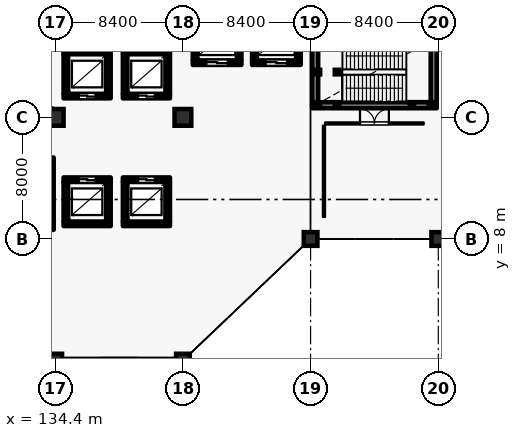
"""IFC4 building model, lengths in metres.
Left out: names, types, materials, properties, quantities, classifications, styles, units other than length and angle.
Written with IfcOpenShell. Run it as: python <this file> out.ifc"""

import sys

from ifc_helpers import new_model, si_unit, direction, frame, frame_2d, origin, origin_2d, place, context, subcontext, project, spatial, rectangle, hollow_rectangle, circle, extrude, element, fill, save


model = new_model("IFC4")
c1 = context("Model", 3, precision=1e-05, world=origin(), true_north=direction((0.0, 1.0)))
c2 = subcontext(c1, "Body", "Model", "MODEL_VIEW")
j1 = project(units=[si_unit("LENGTHUNIT", "METRE"), si_unit("PLANEANGLEUNIT", "RADIAN")], contexts=[c1])
p1 = place(None, origin())
s1 = spatial("IfcSite", under=j1, at=p1, CompositionType="ELEMENT")
p2 = place(p1, origin())
s2 = spatial("IfcBuilding", under=s1, at=p2, CompositionType="ELEMENT")
p3 = place(p2, origin())
s3 = spatial("IfcBuildingStorey", under=s2, at=p3, CompositionType="ELEMENT", Elevation=0.0)
p4 = place(p3, frame((134.4, 0.0, 0.0), z_axis=(0.0, 0.0, 1.0), x_axis=(1.0, 0.0, 0.0)))
e1 = element("IfcColumn", 1, at=p4, inside=s3, PredefinedType="COLUMN", context=c2, shape_type="SweptSolid", body=[
    extrude(circle(Radius=0.45, at=origin_2d()), origin(), (0.0, 0.0, 1.0), 6.0),
])
p5 = place(p3, frame((134.4, 16.0, 0.0), z_axis=(0.0, 0.0, 1.0), x_axis=(1.0, 0.0, 0.0)))
e2 = element("IfcColumn", 2, at=p5, inside=s3, PredefinedType="COLUMN", context=c2, shape_type="SweptSolid", body=[
    extrude(circle(Radius=0.55, at=origin_2d()), origin(), (0.0, 0.0, 1.0), 6.0),
])
p6 = place(p3, frame((142.8, 0.0, 0.0), z_axis=(0.0, 0.0, 1.0), x_axis=(1.0, 0.0, 0.0)))
e3 = element("IfcColumn", 3, at=p6, inside=s3, PredefinedType="COLUMN", context=c2, shape_type="SweptSolid", body=[
    extrude(circle(Radius=0.45, at=origin_2d()), origin(), (0.0, 0.0, 1.0), 6.0),
])
p7 = place(p3, frame((142.8, 16.0, 0.0), z_axis=(0.0, 0.0, 1.0), x_axis=(1.0, 0.0, 0.0)))
e4 = element("IfcColumn", 4, at=p7, inside=s3, PredefinedType="COLUMN", context=c2, shape_type="SweptSolid", body=[
    extrude(circle(Radius=0.55, at=origin_2d()), origin(), (0.0, 0.0, 1.0), 6.0),
])
for number, where, z_axis, x_axis in (
    (5, (151.2, 8.0, 0.0), (0.0, 0.0, 1.0), (1.0, 0.0, 0.0)),
    (6, (159.6, 8.0, 0.0), (0.0, 0.0, 1.0), (1.0, 0.0, 0.0)),
):
    element("IfcColumn", number, at=place(p3, frame(where, z_axis=z_axis, x_axis=x_axis)), inside=s3, PredefinedType="COLUMN", context=c2, shape_type="SweptSolid", body=[
        extrude(circle(Radius=0.45, at=origin_2d()), origin(), (0.0, 0.0, 1.0), 6.0),
    ])
p8 = place(p3, frame((134.95, 17.4, 0.0), z_axis=(0.0, 0.0, 1.0), x_axis=(1.0, 0.0, 0.0)))
e7 = element("IfcWall", 7, at=p8, inside=s3, PredefinedType="SHEAR", context=c2, shape_type="SweptSolid", body=[
    extrude(rectangle(XDim=3.1, YDim=0.3, at=frame_2d((1.55, 0.0))), origin(), (0.0, 0.0, 1.0), 5.675),
])
p9 = place(p8, frame((1.0, 0.0, 0.0)))
e8 = element("IfcOpeningElement", 8, at=p9, cuts=e7, PredefinedType="OPENING", context=c2, shape_type="SweptSolid", body=[
    extrude(rectangle(XDim=1.1, YDim=2.2, at=frame_2d((0.55, 1.1))), frame((0.0, 0.16, 0.0), z_axis=(0.0, -1.0, 0.0), x_axis=(1.0, 0.0, 0.0)), (0.0, 0.0, 1.0), 0.32),
])
p10 = place(p3, frame((137.9, 17.555, 0.0), z_axis=(0.0, 0.0, 1.0), x_axis=(0.0, 1.0, 0.0)))
e9 = element("IfcWall", 9, at=p10, inside=s3, PredefinedType="SHEAR", context=c2, shape_type="SweptSolid", body=[
    extrude(rectangle(XDim=2.59, YDim=0.3, at=frame_2d((1.295, 0.0))), origin(), (0.0, 0.0, 1.0), 5.675),
])
p11 = place(p3, frame((138.05, 20.3, 0.0), z_axis=(0.0, 0.0, 1.0), x_axis=(-1.0, 0.0, 0.0)))
e10 = element("IfcWall", 10, at=p11, inside=s3, PredefinedType="SHEAR", context=c2, shape_type="SweptSolid", body=[
    extrude(rectangle(XDim=3.1, YDim=0.3, at=frame_2d((1.55, 0.0))), origin(), (0.0, 0.0, 1.0), 5.675),
])
p12 = place(p3, frame((135.1, 20.145, 0.0), z_axis=(0.0, 0.0, 1.0), x_axis=(0.0, -1.0, 0.0)))
e11 = element("IfcWall", 11, at=p12, inside=s3, PredefinedType="SHEAR", context=c2, shape_type="SweptSolid", body=[
    extrude(rectangle(XDim=2.59, YDim=0.3, at=frame_2d((1.295, 0.0))), origin(), (0.0, 0.0, 1.0), 5.675),
])
p13 = place(p3, frame((138.85, 17.4, 0.0), z_axis=(0.0, 0.0, 1.0), x_axis=(1.0, 0.0, 0.0)))
e12 = element("IfcWall", 12, at=p13, inside=s3, PredefinedType="SHEAR", context=c2, shape_type="SweptSolid", body=[
    extrude(rectangle(XDim=3.1, YDim=0.3, at=frame_2d((1.55, 0.0))), origin(), (0.0, 0.0, 1.0), 5.675),
])
p14 = place(p13, frame((1.0, 0.0, 0.0)))
e13 = element("IfcOpeningElement", 13, at=p14, cuts=e12, PredefinedType="OPENING", context=c2, shape_type="SweptSolid", body=[
    extrude(rectangle(XDim=1.1, YDim=2.2, at=frame_2d((0.55, 1.1))), frame((0.0, 0.16, 0.0), z_axis=(0.0, -1.0, 0.0), x_axis=(1.0, 0.0, 0.0)), (0.0, 0.0, 1.0), 0.32),
])
p15 = place(p3, frame((141.8, 17.555, 0.0), z_axis=(0.0, 0.0, 1.0), x_axis=(0.0, 1.0, 0.0)))
e14 = element("IfcWall", 14, at=p15, inside=s3, PredefinedType="SHEAR", context=c2, shape_type="SweptSolid", body=[
    extrude(rectangle(XDim=2.59, YDim=0.3, at=frame_2d((1.295, 0.0))), origin(), (0.0, 0.0, 1.0), 5.675),
])
p16 = place(p3, frame((141.95, 20.3, 0.0), z_axis=(0.0, 0.0, 1.0), x_axis=(-1.0, 0.0, 0.0)))
e15 = element("IfcWall", 15, at=p16, inside=s3, PredefinedType="SHEAR", context=c2, shape_type="SweptSolid", body=[
    extrude(rectangle(XDim=3.1, YDim=0.3, at=frame_2d((1.55, 0.0))), origin(), (0.0, 0.0, 1.0), 5.675),
])
p17 = place(p3, frame((139.0, 20.145, 0.0), z_axis=(0.0, 0.0, 1.0), x_axis=(0.0, -1.0, 0.0)))
e16 = element("IfcWall", 16, at=p17, inside=s3, PredefinedType="SHEAR", context=c2, shape_type="SweptSolid", body=[
    extrude(rectangle(XDim=2.59, YDim=0.3, at=frame_2d((1.295, 0.0))), origin(), (0.0, 0.0, 1.0), 5.675),
])
p18 = place(p3, frame((134.95, 9.0, 0.0), z_axis=(0.0, 0.0, 1.0), x_axis=(1.0, 0.0, 0.0)))
e17 = element("IfcWall", 17, at=p18, inside=s3, PredefinedType="SHEAR", context=c2, shape_type="SweptSolid", body=[
    extrude(rectangle(XDim=3.1, YDim=0.3, at=frame_2d((1.55, 0.0))), origin(), (0.0, 0.0, 1.0), 5.675),
])
p19 = place(p3, frame((137.9, 9.155, 0.0), z_axis=(0.0, 0.0, 1.0), x_axis=(0.0, 1.0, 0.0)))
e18 = element("IfcWall", 18, at=p19, inside=s3, PredefinedType="SHEAR", context=c2, shape_type="SweptSolid", body=[
    extrude(rectangle(XDim=2.59, YDim=0.3, at=frame_2d((1.295, 0.0))), origin(), (0.0, 0.0, 1.0), 5.675),
])
p20 = place(p3, frame((138.05, 11.9, 0.0), z_axis=(0.0, 0.0, 1.0), x_axis=(-1.0, 0.0, 0.0)))
e19 = element("IfcWall", 19, at=p20, inside=s3, PredefinedType="SHEAR", context=c2, shape_type="SweptSolid", body=[
    extrude(rectangle(XDim=3.1, YDim=0.3, at=frame_2d((1.55, 0.0))), origin(), (0.0, 0.0, 1.0), 5.675),
])
p21 = place(p20, frame((1.0, 0.0, 0.0)))
e20 = element("IfcOpeningElement", 20, at=p21, cuts=e19, PredefinedType="OPENING", context=c2, shape_type="SweptSolid", body=[
    extrude(rectangle(XDim=1.1, YDim=2.2, at=frame_2d((0.55, 1.1))), frame((0.0, 0.16, 0.0), z_axis=(0.0, -1.0, 0.0), x_axis=(1.0, 0.0, 0.0)), (0.0, 0.0, 1.0), 0.32),
])
p22 = place(p3, frame((135.1, 11.745, 0.0), z_axis=(0.0, 0.0, 1.0), x_axis=(0.0, -1.0, 0.0)))
e21 = element("IfcWall", 21, at=p22, inside=s3, PredefinedType="SHEAR", context=c2, shape_type="SweptSolid", body=[
    extrude(rectangle(XDim=2.59, YDim=0.3, at=frame_2d((1.295, 0.0))), origin(), (0.0, 0.0, 1.0), 5.675),
])
p23 = place(p3, frame((138.85, 9.0, 0.0), z_axis=(0.0, 0.0, 1.0), x_axis=(1.0, 0.0, 0.0)))
e22 = element("IfcWall", 22, at=p23, inside=s3, PredefinedType="SHEAR", context=c2, shape_type="SweptSolid", body=[
    extrude(rectangle(XDim=3.1, YDim=0.3, at=frame_2d((1.55, 0.0))), origin(), (0.0, 0.0, 1.0), 5.675),
])
p24 = place(p3, frame((141.8, 9.155, 0.0), z_axis=(0.0, 0.0, 1.0), x_axis=(0.0, 1.0, 0.0)))
e23 = element("IfcWall", 23, at=p24, inside=s3, PredefinedType="SHEAR", context=c2, shape_type="SweptSolid", body=[
    extrude(rectangle(XDim=2.59, YDim=0.3, at=frame_2d((1.295, 0.0))), origin(), (0.0, 0.0, 1.0), 5.675),
])
p25 = place(p3, frame((141.95, 11.9, 0.0), z_axis=(0.0, 0.0, 1.0), x_axis=(-1.0, 0.0, 0.0)))
e24 = element("IfcWall", 24, at=p25, inside=s3, PredefinedType="SHEAR", context=c2, shape_type="SweptSolid", body=[
    extrude(rectangle(XDim=3.1, YDim=0.3, at=frame_2d((1.55, 0.0))), origin(), (0.0, 0.0, 1.0), 5.675),
])
p26 = place(p25, frame((1.0, 0.0, 0.0)))
e25 = element("IfcOpeningElement", 25, at=p26, cuts=e24, PredefinedType="OPENING", context=c2, shape_type="SweptSolid", body=[
    extrude(rectangle(XDim=1.1, YDim=2.2, at=frame_2d((0.55, 1.1))), frame((0.0, 0.16, 0.0), z_axis=(0.0, -1.0, 0.0), x_axis=(1.0, 0.0, 0.0)), (0.0, 0.0, 1.0), 0.32),
])
p27 = place(p3, frame((139.0, 11.745, 0.0), z_axis=(0.0, 0.0, 1.0), x_axis=(0.0, -1.0, 0.0)))
e26 = element("IfcWall", 26, at=p27, inside=s3, PredefinedType="SHEAR", context=c2, shape_type="SweptSolid", body=[
    extrude(rectangle(XDim=2.59, YDim=0.3, at=frame_2d((1.295, 0.0))), origin(), (0.0, 0.0, 1.0), 5.675),
])
p28 = place(p3, frame((143.45, 19.6, 0.0), z_axis=(0.0, 0.0, 1.0), x_axis=(1.0, 0.0, 0.0)))
e27 = element("IfcWall", 27, at=p28, inside=s3, PredefinedType="SHEAR", context=c2, shape_type="SweptSolid", body=[
    extrude(rectangle(XDim=3.2, YDim=0.3, at=frame_2d((1.6, 0.0))), origin(), (0.0, 0.0, 1.0), 5.675),
])
p29 = place(p28, frame((0.9, 0.0, 0.0)))
e28 = element("IfcOpeningElement", 28, at=p29, cuts=e27, PredefinedType="OPENING", context=c2, shape_type="SweptSolid", body=[
    extrude(rectangle(XDim=1.4, YDim=2.35, at=frame_2d((0.7, 1.175))), frame((0.0, 0.16, 0.0), z_axis=(0.0, -1.0, 0.0), x_axis=(1.0, 0.0, 0.0)), (0.0, 0.0, 1.0), 0.32),
])
for number, where, z_axis, x_axis in (
    (29, (146.5, 19.755, 0.0), (0.0, 0.0, 1.0), (0.0, 1.0, 0.0)),
    (30, (143.6, 22.445, 0.0), (0.0, 0.0, 1.0), (0.0, -1.0, 0.0)),
):
    element("IfcWall", number, at=place(p3, frame(where, z_axis=z_axis, x_axis=x_axis)), inside=s3, PredefinedType="SHEAR", context=c2, shape_type="SweptSolid", body=[
        extrude(rectangle(XDim=2.69, YDim=0.3, at=frame_2d((1.345, 0.0))), origin(), (0.0, 0.0, 1.0), 5.675),
    ])
p30 = place(p3, frame((147.35, 19.6, 0.0), z_axis=(0.0, 0.0, 1.0), x_axis=(1.0, 0.0, 0.0)))
e31 = element("IfcWall", 31, at=p30, inside=s3, PredefinedType="SHEAR", context=c2, shape_type="SweptSolid", body=[
    extrude(rectangle(XDim=3.2, YDim=0.3, at=frame_2d((1.6, 0.0))), origin(), (0.0, 0.0, 1.0), 5.675),
])
p31 = place(p30, frame((0.9, 0.0, 0.0)))
e32 = element("IfcOpeningElement", 32, at=p31, cuts=e31, PredefinedType="OPENING", context=c2, shape_type="SweptSolid", body=[
    extrude(rectangle(XDim=1.4, YDim=2.35, at=frame_2d((0.7, 1.175))), frame((0.0, 0.16, 0.0), z_axis=(0.0, -1.0, 0.0), x_axis=(1.0, 0.0, 0.0)), (0.0, 0.0, 1.0), 0.32),
])
for number, where, z_axis, x_axis in (
    (33, (150.4, 19.755, 0.0), (0.0, 0.0, 1.0), (0.0, 1.0, 0.0)),
    (34, (147.5, 22.445, 0.0), (0.0, 0.0, 1.0), (0.0, -1.0, 0.0)),
):
    element("IfcWall", number, at=place(p3, frame(where, z_axis=z_axis, x_axis=x_axis)), inside=s3, PredefinedType="SHEAR", context=c2, shape_type="SweptSolid", body=[
        extrude(rectangle(XDim=2.69, YDim=0.3, at=frame_2d((1.345, 0.0))), origin(), (0.0, 0.0, 1.0), 5.675),
    ])
p32 = place(p3, frame((126.1, 8.8, 0.0), z_axis=(0.0, 0.0, 1.0), x_axis=(1.0, 0.0, 0.0)))
e35 = element("IfcWall", 35, at=p32, inside=s3, PredefinedType="SHEAR", context=c2, shape_type="SweptSolid", body=[
    extrude(rectangle(XDim=8.2, YDim=0.4, at=frame_2d((4.1, 0.0))), origin(), (0.0, 0.0, 1.0), 5.675),
])
p33 = place(p3, frame((134.1, 9.005, 0.0), z_axis=(0.0, 0.0, 1.0), x_axis=(0.0, 1.0, 0.0)))
e36 = element("IfcWall", 36, at=p33, inside=s3, PredefinedType="SHEAR", context=c2, shape_type="SweptSolid", body=[
    extrude(rectangle(XDim=3.95, YDim=0.4, at=frame_2d((1.975, 0.0))), origin(), (0.0, 0.0, 1.0), 5.675),
])
p34 = place(p3, frame((126.1, 13.16, 0.0), z_axis=(0.0, 0.0, 1.0), x_axis=(1.0, 0.0, 0.0)))
e37 = element("IfcWall", 37, at=p34, inside=s3, PredefinedType="SHEAR", context=c2, shape_type="SweptSolid", body=[
    extrude(rectangle(XDim=8.2, YDim=0.4, at=frame_2d((4.1, 0.0))), origin(), (0.0, 0.0, 1.0), 5.675),
])
p35 = place(p34, frame((0.43, 0.0, 0.0)))
e38 = element("IfcOpeningElement", 38, at=p35, cuts=e37, PredefinedType="OPENING", context=c2, shape_type="SweptSolid", body=[
    extrude(rectangle(XDim=1.16, YDim=2.2, at=frame_2d((0.58, 1.1))), frame((0.0, 0.21, 0.0), z_axis=(0.0, -1.0, 0.0), x_axis=(1.0, 0.0, 0.0)), (0.0, 0.0, 1.0), 0.42),
])
p36 = place(p3, frame((151.3, 16.8, 0.0), z_axis=(0.0, 0.0, 1.0), x_axis=(1.0, 0.0, 0.0)))
e39 = element("IfcWall", 39, at=p36, inside=s3, PredefinedType="SHEAR", context=c2, shape_type="SweptSolid", body=[
    extrude(rectangle(XDim=8.2, YDim=0.4, at=frame_2d((4.1, 0.0))), origin(), (0.0, 0.0, 1.0), 5.675),
])
for number, where, z_axis, x_axis in (
    (40, (159.3, 17.005, 0.0), (0.0, 0.0, 1.0), (0.0, 1.0, 0.0)),
    (41, (151.5, 17.005, 0.0), (0.0, 0.0, 1.0), (0.0, 1.0, 0.0)),
):
    element("IfcWall", number, at=place(p3, frame(where, z_axis=z_axis, x_axis=x_axis)), inside=s3, PredefinedType="SHEAR", context=c2, shape_type="SweptSolid", body=[
        extrude(rectangle(XDim=3.95, YDim=0.4, at=frame_2d((1.975, 0.0))), origin(), (0.0, 0.0, 1.0), 5.675),
    ])
for number, where, z_axis, x_axis in (
    (42, (151.68, 16.8, 0.0), (0.0, 0.0, 1.0), (1.0, 0.0, 0.0)),
    (43, (151.68, 18.98, 0.0), (0.0, 0.0, 1.0), (1.0, 0.0, 0.0)),
    (44, (152.94, 16.8, 0.0), (0.0, 0.0, 1.0), (1.0, 0.0, 0.0)),
    (45, (152.94, 18.98, 0.0), (0.0, 0.0, 1.0), (1.0, 0.0, 0.0)),
):
    element("IfcColumn", number, at=place(p3, frame(where, z_axis=z_axis, x_axis=x_axis)), inside=s3, PredefinedType="COLUMN", context=c2, shape_type="SweptSolid", body=[
        extrude(hollow_rectangle(XDim=0.3, YDim=0.3, WallThickness=0.012, at=origin_2d()), origin(), (0.0, 0.0, 1.0), 5.82),
    ])
for number, where, z_axis, x_axis in (
    (46, (157.86, 16.8, -2.7), (0.0, 0.0, 1.0), (1.0, 0.0, 0.0)),
    (47, (159.12, 16.8, -2.7), (0.0, 0.0, 1.0), (1.0, 0.0, 0.0)),
):
    element("IfcColumn", number, at=place(p3, frame(where, z_axis=z_axis, x_axis=x_axis)), inside=s3, PredefinedType="COLUMN", context=c2, shape_type="SweptSolid", body=[
        extrude(hollow_rectangle(XDim=0.3, YDim=0.3, WallThickness=0.012, at=origin_2d()), origin(), (0.0, 0.0, 1.0), 5.52),
    ])
p37 = place(p3, frame((152.16, 15.6, 0.0), z_axis=(0.0, 0.0, 1.0), x_axis=(1.0, 0.0, 0.0)))
e48 = element("IfcWall", 48, at=p37, inside=s3, PredefinedType="PARTITIONING", context=c2, shape_type="SweptSolid", body=[
    extrude(rectangle(XDim=6.48, YDim=0.14, at=frame_2d((3.24, 0.0))), origin(), (0.0, 0.0, 1.0), 5.675),
])
p38 = place(p37, frame((2.29, 0.0, 0.0)))
e49 = element("IfcOpeningElement", 49, at=p38, cuts=e48, PredefinedType="OPENING", context=c2, shape_type="SweptSolid", body=[
    extrude(rectangle(XDim=1.9, YDim=2.4, at=frame_2d((0.95, 1.2))), frame((0.0, 0.08, 0.0), z_axis=(0.0, -1.0, 0.0), x_axis=(1.0, 0.0, 0.0)), (0.0, 0.0, 1.0), 0.16),
])
p39 = place(p3, frame((152.08, 9.45, 0.0), z_axis=(0.0, 0.0, 1.0), x_axis=(0.0, 1.0, 0.0)))
e50 = element("IfcWall", 50, at=p39, inside=s3, PredefinedType="PARTITIONING", context=c2, shape_type="SweptSolid", body=[
    extrude(rectangle(XDim=6.01, YDim=0.14, at=frame_2d((3.005, 0.0))), origin(), (0.0, 0.0, 1.0), 5.675),
])
p40 = place(p9, origin())
e51 = element("IfcDoor", 51, at=p40, inside=s3, OperationType="DOUBLE_DOOR_SLIDING", PredefinedType="DOOR", context=c2, shape_type="SweptSolid", body=[
    extrude(rectangle(XDim=1.1, YDim=2.2, at=frame_2d((0.55, 1.1))), frame((0.0, 0.025, 0.0), z_axis=(0.0, -1.0, 0.0), x_axis=(1.0, 0.0, 0.0)), (0.0, 0.0, 1.0), 0.05),
])
fill(e8, e51)
p41 = place(p14, origin())
e52 = element("IfcDoor", 52, at=p41, inside=s3, OperationType="DOUBLE_DOOR_SLIDING", PredefinedType="DOOR", context=c2, shape_type="SweptSolid", body=[
    extrude(rectangle(XDim=1.1, YDim=2.2, at=frame_2d((0.55, 1.1))), frame((0.0, 0.025, 0.0), z_axis=(0.0, -1.0, 0.0), x_axis=(1.0, 0.0, 0.0)), (0.0, 0.0, 1.0), 0.05),
])
fill(e13, e52)
p42 = place(p21, origin())
e53 = element("IfcDoor", 53, at=p42, inside=s3, OperationType="DOUBLE_DOOR_SLIDING", PredefinedType="DOOR", context=c2, shape_type="SweptSolid", body=[
    extrude(rectangle(XDim=1.1, YDim=2.2, at=frame_2d((0.55, 1.1))), frame((0.0, 0.025, 0.0), z_axis=(0.0, -1.0, 0.0), x_axis=(1.0, 0.0, 0.0)), (0.0, 0.0, 1.0), 0.05),
])
fill(e20, e53)
p43 = place(p26, origin())
e54 = element("IfcDoor", 54, at=p43, inside=s3, OperationType="DOUBLE_DOOR_SLIDING", PredefinedType="DOOR", context=c2, shape_type="SweptSolid", body=[
    extrude(rectangle(XDim=1.1, YDim=2.2, at=frame_2d((0.55, 1.1))), frame((0.0, 0.025, 0.0), z_axis=(0.0, -1.0, 0.0), x_axis=(1.0, 0.0, 0.0)), (0.0, 0.0, 1.0), 0.05),
])
fill(e25, e54)
p44 = place(p29, origin())
e55 = element("IfcDoor", 55, at=p44, inside=s3, OperationType="DOUBLE_DOOR_SLIDING", PredefinedType="DOOR", context=c2, shape_type="SweptSolid", body=[
    extrude(rectangle(XDim=1.4, YDim=2.35, at=frame_2d((0.7, 1.175))), frame((0.0, 0.025, 0.0), z_axis=(0.0, -1.0, 0.0), x_axis=(1.0, 0.0, 0.0)), (0.0, 0.0, 1.0), 0.05),
])
fill(e28, e55)
p45 = place(p31, origin())
e56 = element("IfcDoor", 56, at=p45, inside=s3, OperationType="DOUBLE_DOOR_SLIDING", PredefinedType="DOOR", context=c2, shape_type="SweptSolid", body=[
    extrude(rectangle(XDim=1.4, YDim=2.35, at=frame_2d((0.7, 1.175))), frame((0.0, 0.025, 0.0), z_axis=(0.0, -1.0, 0.0), x_axis=(1.0, 0.0, 0.0)), (0.0, 0.0, 1.0), 0.05),
])
fill(e32, e56)
p46 = place(p38, origin())
e57 = element("IfcDoor", 57, at=p46, inside=s3, OperationType="DOUBLE_DOOR_SINGLE_SWING", PredefinedType="DOOR", context=c2, shape_type="SweptSolid", body=[
    extrude(rectangle(XDim=1.9, YDim=2.4, at=frame_2d((0.95, 1.2))), frame((0.0, 0.025, 0.0), z_axis=(0.0, -1.0, 0.0), x_axis=(1.0, 0.0, 0.0)), (0.0, 0.0, 1.0), 0.05),
])
fill(e49, e57)
save(model, sys.argv[1])
